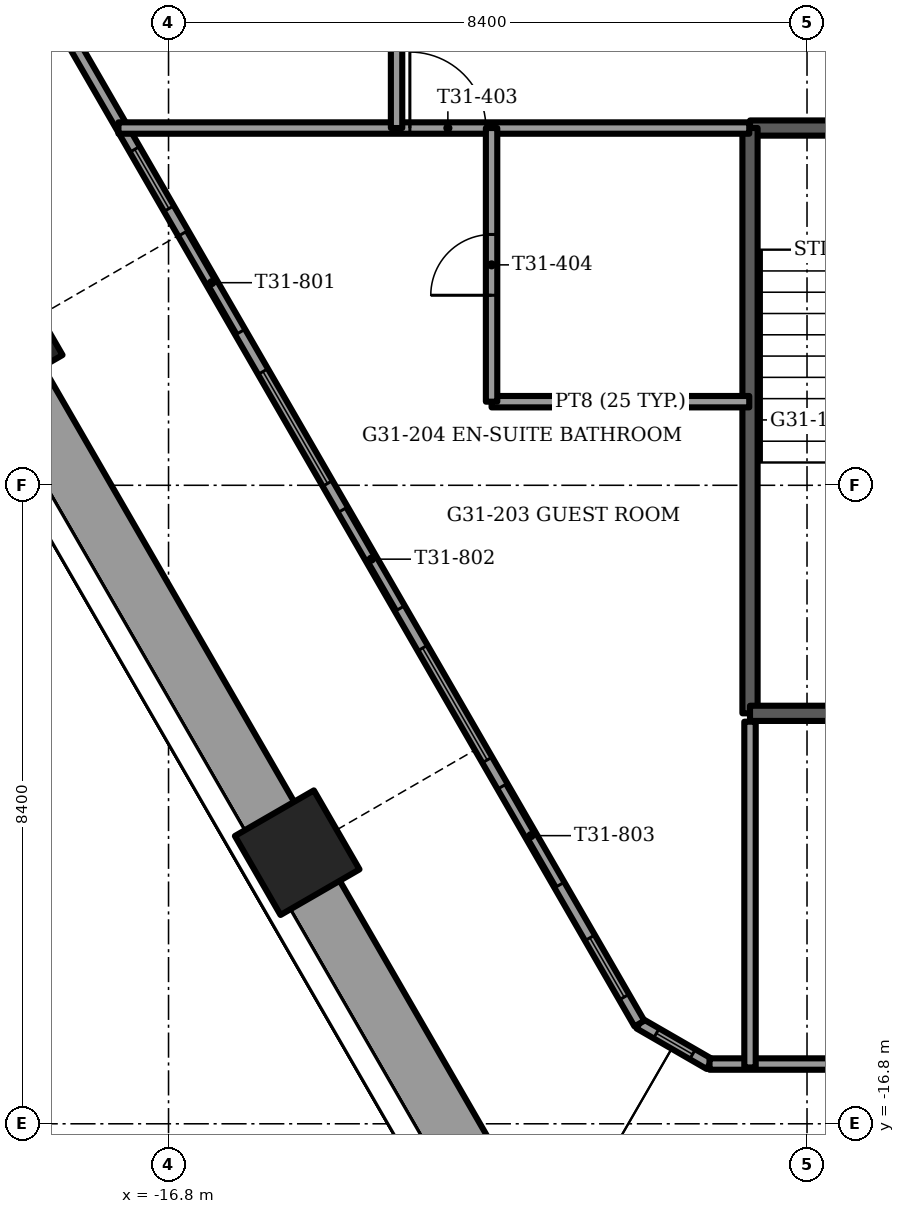
"""IFC4 building model, lengths in metres.
Left out: names, types, materials, properties, quantities, classifications, styles, units other than length and angle.
Written with IfcOpenShell. Run it as: python <this file> out.ifc"""

import sys

from ifc_helpers import new_model, si_unit, direction, frame, frame_2d, origin, origin_2d, place, context, subcontext, project, spatial, rectangle, extrude, element, fill, save


model = new_model("IFC4")
c1 = context("Model", 3, precision=1e-05, world=origin(), true_north=direction((0.0, 1.0)))
c2 = subcontext(c1, "Body", "Model", "MODEL_VIEW")
j1 = project(units=[si_unit("LENGTHUNIT", "METRE"), si_unit("PLANEANGLEUNIT", "RADIAN")], contexts=[c1])
p1 = place(None, origin())
s1 = spatial("IfcSite", under=j1, at=p1, CompositionType="ELEMENT")
p2 = place(p1, origin())
s2 = spatial("IfcBuilding", under=s1, at=p2, CompositionType="ELEMENT")
p3 = place(p2, frame((0.0, 0.0, 127.25)))
s3 = spatial("IfcBuildingStorey", under=s2, at=p3, CompositionType="ELEMENT", Elevation=127.25)
for number, where, z_axis, x_axis in (
    (1, (-19.014, -6.467, -1.2), (0.0, 0.0, 1.0), (-0.5, 0.866, 0.0)),
    (2, (-15.107, -13.233, -1.2), (0.0, 0.0, 1.0), (-0.5, 0.866, 0.0)),
):
    element("IfcColumn", number, at=place(p3, frame(where, z_axis=z_axis, x_axis=x_axis)), inside=s3, PredefinedType="COLUMN", context=c2, shape_type="SweptSolid", body=[
        extrude(rectangle(XDim=1.2, YDim=1.2, at=origin_2d()), origin(), (0.0, 0.0, 1.0), 3.75),
    ])
p4 = place(p3, frame((-18.859, -7.035, 0.0), z_axis=(0.0, 0.0, 1.0), x_axis=(0.499999023957, -0.866025967302, 0.0)))
e3 = element("IfcWall", 3, at=p4, inside=s3, PredefinedType="PARAPET", context=c2, shape_type="SweptSolid", body=[
    extrude(rectangle(XDim=6.673, YDim=0.9, at=frame_2d((3.337, 0.0))), origin(), (0.0, 0.0, 1.0), 1.1),
])
p5 = place(p3, frame((-14.952, -13.802, 0.0), z_axis=(0.0, 0.0, 1.0), x_axis=(0.499982573574, -0.866035464703, 0.0)))
e4 = element("IfcWall", 4, at=p5, inside=s3, PredefinedType="PARAPET", context=c2, shape_type="SweptSolid", body=[
    extrude(rectangle(XDim=5.281, YDim=0.9, at=frame_2d((2.641, 0.0))), origin(), (0.0, 0.0, 1.0), 1.1),
])
p6 = place(p3, frame((-18.71, -1.444, 0.0), z_axis=(0.0, 0.0, 1.0), x_axis=(0.500010582961, -0.866019293623, 0.0)))
e5 = element("IfcWall", 5, at=p6, inside=s3, PredefinedType="SOLIDWALL", context=c2, shape_type="SweptSolid", body=[
    extrude(rectangle(XDim=16.21, YDim=0.15, at=frame_2d((8.105, 0.0))), origin(), (0.0, 0.0, 1.0), 3.45),
])
p7 = place(p6, frame((2.93, 0.0, 0.15)))
e6 = element("IfcOpeningElement", 6, at=p7, cuts=e5, PredefinedType="OPENING", context=c2, shape_type="SweptSolid", body=[
    extrude(rectangle(XDim=0.9, YDim=2.85, at=frame_2d((0.45, 1.425))), frame((0.0, 0.075, 0.0), z_axis=(0.0, -1.0, 0.0), x_axis=(1.0, 0.0, 0.0)), (0.0, 0.0, 1.0), 0.15),
])
p8 = place(p6, frame((4.205, 0.0, 0.0)))
e7 = element("IfcOpeningElement", 7, at=p8, cuts=e5, PredefinedType="OPENING", context=c2, shape_type="SweptSolid", body=[
    extrude(rectangle(XDim=1.5, YDim=2.4, at=frame_2d((0.75, 1.2))), frame((0.0, 0.075, 0.0), z_axis=(0.0, -1.0, 0.0), x_axis=(1.0, 0.0, 0.0)), (0.0, 0.0, 1.0), 0.15),
])
p9 = place(p6, frame((6.305, 0.0, 0.15)))
e8 = element("IfcOpeningElement", 8, at=p9, cuts=e5, PredefinedType="OPENING", context=c2, shape_type="SweptSolid", body=[
    extrude(rectangle(XDim=1.7, YDim=2.85, at=frame_2d((0.85, 1.425))), frame((0.0, 0.075, 0.0), z_axis=(0.0, -1.0, 0.0), x_axis=(1.0, 0.0, 0.0)), (0.0, 0.0, 1.0), 0.15),
])
p10 = place(p6, frame((8.405, 0.0, 0.0)))
e9 = element("IfcOpeningElement", 9, at=p10, cuts=e5, PredefinedType="OPENING", context=c2, shape_type="SweptSolid", body=[
    extrude(rectangle(XDim=1.5, YDim=2.4, at=frame_2d((0.75, 1.2))), frame((0.0, 0.075, 0.0), z_axis=(0.0, -1.0, 0.0), x_axis=(1.0, 0.0, 0.0)), (0.0, 0.0, 1.0), 0.15),
])
p11 = place(p6, frame((10.505, 0.0, 0.15)))
e10 = element("IfcOpeningElement", 10, at=p11, cuts=e5, PredefinedType="OPENING", context=c2, shape_type="SweptSolid", body=[
    extrude(rectangle(XDim=1.7, YDim=2.85, at=frame_2d((0.85, 1.425))), frame((0.0, 0.075, 0.0), z_axis=(0.0, -1.0, 0.0), x_axis=(1.0, 0.0, 0.0)), (0.0, 0.0, 1.0), 0.15),
])
p12 = place(p6, frame((12.605, 0.0, 0.0)))
e11 = element("IfcOpeningElement", 11, at=p12, cuts=e5, PredefinedType="OPENING", context=c2, shape_type="SweptSolid", body=[
    extrude(rectangle(XDim=1.5, YDim=2.4, at=frame_2d((0.75, 1.2))), frame((0.0, 0.075, 0.0), z_axis=(0.0, -1.0, 0.0), x_axis=(1.0, 0.0, 0.0)), (0.0, 0.0, 1.0), 0.15),
])
p13 = place(p6, frame((0.402, 0.0, 0.15)))
e12 = element("IfcOpeningElement", 12, at=p13, cuts=e5, PredefinedType="OPENING", context=c2, shape_type="SweptSolid", body=[
    extrude(rectangle(XDim=0.9, YDim=2.73, at=frame_2d((0.45, 1.365))), frame((0.0, 0.075, 0.0), z_axis=(0.0, -1.0, 0.0), x_axis=(1.0, 0.0, 0.0)), (0.0, 0.0, 1.0), 0.15),
])
p14 = place(p6, frame((14.907, 0.0, 0.15)))
e13 = element("IfcOpeningElement", 13, at=p14, cuts=e5, PredefinedType="OPENING", context=c2, shape_type="SweptSolid", body=[
    extrude(rectangle(XDim=0.9, YDim=2.73, at=frame_2d((0.45, 1.365))), frame((0.0, 0.075, 0.0), z_axis=(0.0, -1.0, 0.0), x_axis=(1.0, 0.0, 0.0)), (0.0, 0.0, 1.0), 0.15),
])
p15 = place(p3, frame((-9.683, -16.014, 0.0), z_axis=(0.0, 0.0, 1.0), x_axis=(1.0, 0.0, 0.0)))
e14 = element("IfcWall", 14, at=p15, inside=s3, PredefinedType="SOLIDWALL", context=c2, shape_type="SweptSolid", body=[
    extrude(rectangle(XDim=19.365, YDim=0.15, at=frame_2d((9.683, 0.0))), origin(), (0.0, 0.0, 1.0), 3.45),
])
p16 = place(p15, frame((1.583, 0.0, 0.15)))
e15 = element("IfcOpeningElement", 15, at=p16, cuts=e14, PredefinedType="OPENING", context=c2, shape_type="SweptSolid", body=[
    extrude(rectangle(XDim=1.7, YDim=2.85, at=frame_2d((0.85, 1.425))), frame((0.0, 0.075, 0.0), z_axis=(0.0, -1.0, 0.0), x_axis=(1.0, 0.0, 0.0)), (0.0, 0.0, 1.0), 0.15),
])
p17 = place(p15, frame((5.833, 0.0, 0.15)))
e16 = element("IfcOpeningElement", 16, at=p17, cuts=e14, PredefinedType="OPENING", context=c2, shape_type="SweptSolid", body=[
    extrude(rectangle(XDim=0.9, YDim=2.85, at=frame_2d((0.45, 1.425))), frame((0.0, 0.075, 0.0), z_axis=(0.0, -1.0, 0.0), x_axis=(1.0, 0.0, 0.0)), (0.0, 0.0, 1.0), 0.15),
])
p18 = place(p15, frame((7.283, 0.0, 0.0)))
e17 = element("IfcOpeningElement", 17, at=p18, cuts=e14, PredefinedType="OPENING", context=c2, shape_type="SweptSolid", body=[
    extrude(rectangle(XDim=1.5, YDim=2.4, at=frame_2d((0.75, 1.2))), frame((0.0, 0.075, 0.0), z_axis=(0.0, -1.0, 0.0), x_axis=(1.0, 0.0, 0.0)), (0.0, 0.0, 1.0), 0.15),
])
p19 = place(p15, frame((10.033, 0.0, 0.15)))
e18 = element("IfcOpeningElement", 18, at=p19, cuts=e14, PredefinedType="OPENING", context=c2, shape_type="SweptSolid", body=[
    extrude(rectangle(XDim=1.7, YDim=2.85, at=frame_2d((0.85, 1.425))), frame((0.0, 0.075, 0.0), z_axis=(0.0, -1.0, 0.0), x_axis=(1.0, 0.0, 0.0)), (0.0, 0.0, 1.0), 0.15),
])
p20 = place(p15, frame((12.083, 0.0, 0.0)))
e19 = element("IfcOpeningElement", 19, at=p20, cuts=e14, PredefinedType="OPENING", context=c2, shape_type="SweptSolid", body=[
    extrude(rectangle(XDim=1.5, YDim=2.4, at=frame_2d((0.75, 1.2))), frame((0.0, 0.075, 0.0), z_axis=(0.0, -1.0, 0.0), x_axis=(1.0, 0.0, 0.0)), (0.0, 0.0, 1.0), 0.15),
])
p21 = place(p15, frame((15.833, 0.0, 0.15)))
e20 = element("IfcOpeningElement", 20, at=p21, cuts=e14, PredefinedType="OPENING", context=c2, shape_type="SweptSolid", body=[
    extrude(rectangle(XDim=1.7, YDim=2.85, at=frame_2d((0.85, 1.425))), frame((0.0, 0.075, 0.0), z_axis=(0.0, -1.0, 0.0), x_axis=(1.0, 0.0, 0.0)), (0.0, 0.0, 1.0), 0.15),
])
p22 = place(p3, frame((-10.605, -15.481, 0.0), z_axis=(0.0, 0.0, 1.0), x_axis=(0.866048165231, -0.499960573946, 0.0)))
e21 = element("IfcWall", 21, at=p22, inside=s3, PredefinedType="SOLIDWALL", context=c2, shape_type="SweptSolid", body=[
    extrude(rectangle(XDim=1.065, YDim=0.15, at=frame_2d((0.532, 0.0))), origin(), (0.0, 0.0, 1.0), 3.45),
])
p23 = place(p22, frame((0.258, 0.0, 0.15)))
e22 = element("IfcOpeningElement", 22, at=p23, cuts=e21, PredefinedType="OPENING", context=c2, shape_type="SweptSolid", body=[
    extrude(rectangle(XDim=0.55, YDim=2.85, at=frame_2d((0.275, 1.425))), frame((0.0, 0.075, 0.0), z_axis=(0.0, -1.0, 0.0), x_axis=(1.0, 0.0, 0.0)), (0.0, 0.0, 1.0), 0.15),
])
p24 = place(p3, frame((-9.15, -3.7, -0.3), z_axis=(0.0, 0.0, 1.0), x_axis=(1.0, 0.0, 0.0)))
e23 = element("IfcWall", 23, at=p24, inside=s3, PredefinedType="SOLIDWALL", context=c2, shape_type="SweptSolid", body=[
    extrude(rectangle(XDim=3.35, YDim=0.2, at=frame_2d((1.675, 0.0))), origin(), (0.0, 0.0, 1.0), 3.75),
])
p25 = place(p24, frame((1.125, 0.0, 0.0)))
e24 = element("IfcOpeningElement", 24, at=p25, cuts=e23, PredefinedType="OPENING", context=c2, shape_type="SweptSolid", body=[
    extrude(rectangle(XDim=1.1, YDim=2.1, at=frame_2d((0.55, 1.05))), frame((0.0, 0.1, 0.0), z_axis=(0.0, -1.0, 0.0), x_axis=(1.0, 0.0, 0.0)), (0.0, 0.0, 1.0), 0.2),
])
p26 = place(p3, frame((-9.15, -3.7, -0.3), z_axis=(0.0, 0.0, 1.0), x_axis=(0.0, -1.0, 0.0)))
e25 = element("IfcWall", 25, at=p26, inside=s3, PredefinedType="SOLIDWALL", context=c2, shape_type="SweptSolid", body=[
    extrude(rectangle(XDim=7.7, YDim=0.2, at=frame_2d((3.85, 0.0))), origin(), (0.0, 0.0, 1.0), 3.75),
])
p27 = place(p3, frame((-9.15, -11.4, -0.3), z_axis=(0.0, 0.0, 1.0), x_axis=(1.0, 0.0, 0.0)))
e26 = element("IfcWall", 26, at=p27, inside=s3, PredefinedType="SOLIDWALL", context=c2, shape_type="SweptSolid", body=[
    extrude(rectangle(XDim=3.35, YDim=0.2, at=frame_2d((1.675, 0.0))), origin(), (0.0, 0.0, 1.0), 3.75),
])
p28 = place(p3, frame((-12.55, -7.3, 0.0), z_axis=(0.0, 0.0, 1.0), x_axis=(1.0, 0.0, 0.0)))
e27 = element("IfcWall", 27, at=p28, inside=s3, PredefinedType="PARTITIONING", context=c2, shape_type="SweptSolid", body=[
    extrude(rectangle(XDim=3.39, YDim=0.15, at=frame_2d((1.695, 0.0))), origin(), (0.0, 0.0, 1.0), 3.45),
])
p29 = place(p3, frame((-17.459, -3.7, 0.0), z_axis=(0.0, 0.0, 1.0), x_axis=(1.0, 0.0, 0.0)))
e28 = element("IfcWall", 28, at=p29, inside=s3, PredefinedType="PARTITIONING", context=c2, shape_type="SweptSolid", body=[
    extrude(rectangle(XDim=8.299, YDim=0.15, at=frame_2d((4.149, 0.0))), origin(), (0.0, 0.0, 1.0), 3.45),
])
p30 = place(p29, frame((3.834, 0.0, 0.0)))
e29 = element("IfcOpeningElement", 29, at=p30, cuts=e28, PredefinedType="OPENING", context=c2, shape_type="SweptSolid", body=[
    extrude(rectangle(XDim=1.0, YDim=2.1, at=frame_2d((0.5, 1.05))), frame((0.0, 0.075, 0.0), z_axis=(0.0, -1.0, 0.0), x_axis=(1.0, 0.0, 0.0)), (0.0, 0.0, 1.0), 0.15),
])
p31 = place(p3, frame((-9.15, -16.059, 0.0), z_axis=(0.0, 0.0, 1.0), x_axis=(0.0, 1.0, 0.0)))
e30 = element("IfcWall", 30, at=p31, inside=s3, PredefinedType="PARTITIONING", context=c2, shape_type="SweptSolid", body=[
    extrude(rectangle(XDim=4.549, YDim=0.15, at=frame_2d((2.274, 0.0))), origin(), (0.0, 0.0, 1.0), 3.45),
])
p32 = place(p3, frame((-12.55, -7.3, 0.0), z_axis=(0.0, 0.0, 1.0), x_axis=(0.0, 1.0, 0.0)))
e31 = element("IfcWall", 31, at=p32, inside=s3, PredefinedType="PARTITIONING", context=c2, shape_type="SweptSolid", body=[
    extrude(rectangle(XDim=3.6, YDim=0.15, at=frame_2d((1.8, 0.0))), origin(), (0.0, 0.0, 1.0), 3.45),
])
p33 = place(p32, frame((1.4, 0.0, 0.0)))
e32 = element("IfcOpeningElement", 32, at=p33, cuts=e31, PredefinedType="OPENING", context=c2, shape_type="SweptSolid", body=[
    extrude(rectangle(XDim=0.8, YDim=2.1, at=frame_2d((0.4, 1.05))), frame((0.0, 0.075, 0.0), z_axis=(0.0, -1.0, 0.0), x_axis=(1.0, 0.0, 0.0)), (0.0, 0.0, 1.0), 0.15),
])
p34 = place(p3, frame((-13.8, -3.7, 0.0), z_axis=(0.0, 0.0, 1.0), x_axis=(0.0, 1.0, 0.0)))
e33 = element("IfcWall", 33, at=p34, inside=s3, PredefinedType="PARTITIONING", context=c2, shape_type="SweptSolid", body=[
    extrude(rectangle(XDim=11.916, YDim=0.15, at=frame_2d((5.958, 0.0))), origin(), (0.0, 0.0, 1.0), 3.45),
])
p35 = place(p34, frame((4.227, 0.0, 0.0)))
e34 = element("IfcOpeningElement", 34, at=p35, cuts=e33, PredefinedType="OPENING", context=c2, shape_type="SweptSolid", body=[
    extrude(rectangle(XDim=1.0, YDim=2.1, at=frame_2d((0.5, 1.05))), frame((0.0, 0.075, 0.0), z_axis=(0.0, -1.0, 0.0), x_axis=(1.0, 0.0, 0.0)), (0.0, 0.0, 1.0), 0.15),
])
p36 = place(p34, frame((9.538, 0.0, 0.0)))
e35 = element("IfcOpeningElement", 35, at=p36, cuts=e33, PredefinedType="OPENING", context=c2, shape_type="SweptSolid", body=[
    extrude(rectangle(XDim=1.0, YDim=2.1, at=frame_2d((0.5, 1.05))), frame((0.0, 0.075, 0.0), z_axis=(0.0, -1.0, 0.0), x_axis=(1.0, 0.0, 0.0)), (0.0, 0.0, 1.0), 0.15),
])
p37 = place(p7, origin())
e36 = element("IfcWindow", 36, at=p37, inside=s3, PartitioningType="SINGLE_PANEL", PredefinedType="WINDOW", context=c2, shape_type="SweptSolid", body=[
    extrude(rectangle(XDim=0.9, YDim=2.85, at=frame_2d((0.45, 1.425))), frame((0.0, 0.03, 0.0), z_axis=(0.0, -1.0, 0.0), x_axis=(1.0, 0.0, 0.0)), (0.0, 0.0, 1.0), 0.06),
])
fill(e6, e36)
p38 = place(p8, origin())
e37 = element("IfcDoor", 37, at=p38, inside=s3, OperationType="SLIDING_TO_LEFT", PredefinedType="DOOR", context=c2, shape_type="SweptSolid", body=[
    extrude(rectangle(XDim=1.5, YDim=2.4, at=frame_2d((0.75, 1.2))), frame((0.0, 0.025, 0.0), z_axis=(0.0, -1.0, 0.0), x_axis=(1.0, 0.0, 0.0)), (0.0, 0.0, 1.0), 0.05),
])
fill(e7, e37)
p39 = place(p9, origin())
e38 = element("IfcWindow", 38, at=p39, inside=s3, PartitioningType="SINGLE_PANEL", PredefinedType="WINDOW", context=c2, shape_type="SweptSolid", body=[
    extrude(rectangle(XDim=1.7, YDim=2.85, at=frame_2d((0.85, 1.425))), frame((0.0, 0.03, 0.0), z_axis=(0.0, -1.0, 0.0), x_axis=(1.0, 0.0, 0.0)), (0.0, 0.0, 1.0), 0.06),
])
fill(e8, e38)
p40 = place(p10, origin())
e39 = element("IfcDoor", 39, at=p40, inside=s3, OperationType="SLIDING_TO_RIGHT", PredefinedType="DOOR", context=c2, shape_type="SweptSolid", body=[
    extrude(rectangle(XDim=1.5, YDim=2.4, at=frame_2d((0.75, 1.2))), frame((0.0, 0.025, 0.0), z_axis=(0.0, -1.0, 0.0), x_axis=(1.0, 0.0, 0.0)), (0.0, 0.0, 1.0), 0.05),
])
fill(e9, e39)
p41 = place(p11, origin())
e40 = element("IfcWindow", 40, at=p41, inside=s3, PartitioningType="SINGLE_PANEL", PredefinedType="WINDOW", context=c2, shape_type="SweptSolid", body=[
    extrude(rectangle(XDim=1.7, YDim=2.85, at=frame_2d((0.85, 1.425))), frame((0.0, 0.03, 0.0), z_axis=(0.0, -1.0, 0.0), x_axis=(1.0, 0.0, 0.0)), (0.0, 0.0, 1.0), 0.06),
])
fill(e10, e40)
p42 = place(p12, origin())
e41 = element("IfcDoor", 41, at=p42, inside=s3, OperationType="SLIDING_TO_LEFT", PredefinedType="DOOR", context=c2, shape_type="SweptSolid", body=[
    extrude(rectangle(XDim=1.5, YDim=2.4, at=frame_2d((0.75, 1.2))), frame((0.0, 0.025, 0.0), z_axis=(0.0, -1.0, 0.0), x_axis=(1.0, 0.0, 0.0)), (0.0, 0.0, 1.0), 0.05),
])
fill(e11, e41)
p43 = place(p14, origin())
e42 = element("IfcWindow", 42, at=p43, inside=s3, PartitioningType="SINGLE_PANEL", PredefinedType="WINDOW", context=c2, shape_type="SweptSolid", body=[
    extrude(rectangle(XDim=0.9, YDim=2.73, at=frame_2d((0.45, 1.365))), frame((0.0, 0.03, 0.0), z_axis=(0.0, -1.0, 0.0), x_axis=(1.0, 0.0, 0.0)), (0.0, 0.0, 1.0), 0.06),
])
fill(e13, e42)
p44 = place(p23, origin())
e43 = element("IfcWindow", 43, at=p44, inside=s3, PartitioningType="SINGLE_PANEL", PredefinedType="WINDOW", context=c2, shape_type="SweptSolid", body=[
    extrude(rectangle(XDim=0.55, YDim=2.85, at=frame_2d((0.275, 1.425))), frame((0.0, 0.03, 0.0), z_axis=(0.0, -1.0, 0.0), x_axis=(1.0, 0.0, 0.0)), (0.0, 0.0, 1.0), 0.06),
])
fill(e22, e43)
p45 = place(p30, origin())
e44 = element("IfcDoor", 44, at=p45, inside=s3, OperationType="SINGLE_SWING_LEFT", PredefinedType="DOOR", context=c2, shape_type="SweptSolid", body=[
    extrude(rectangle(XDim=1.0, YDim=2.1, at=frame_2d((0.5, 1.05))), frame((0.0, 0.025, 0.0), z_axis=(0.0, -1.0, 0.0), x_axis=(1.0, 0.0, 0.0)), (0.0, 0.0, 1.0), 0.05),
])
fill(e29, e44)
p46 = place(p33, origin())
e45 = element("IfcDoor", 45, at=p46, inside=s3, OperationType="SINGLE_SWING_RIGHT", PredefinedType="DOOR", context=c2, shape_type="SweptSolid", body=[
    extrude(rectangle(XDim=0.8, YDim=2.1, at=frame_2d((0.4, 1.05))), frame((0.0, 0.025, 0.0), z_axis=(0.0, -1.0, 0.0), x_axis=(1.0, 0.0, 0.0)), (0.0, 0.0, 1.0), 0.05),
])
fill(e32, e45)
save(model, sys.argv[1])
